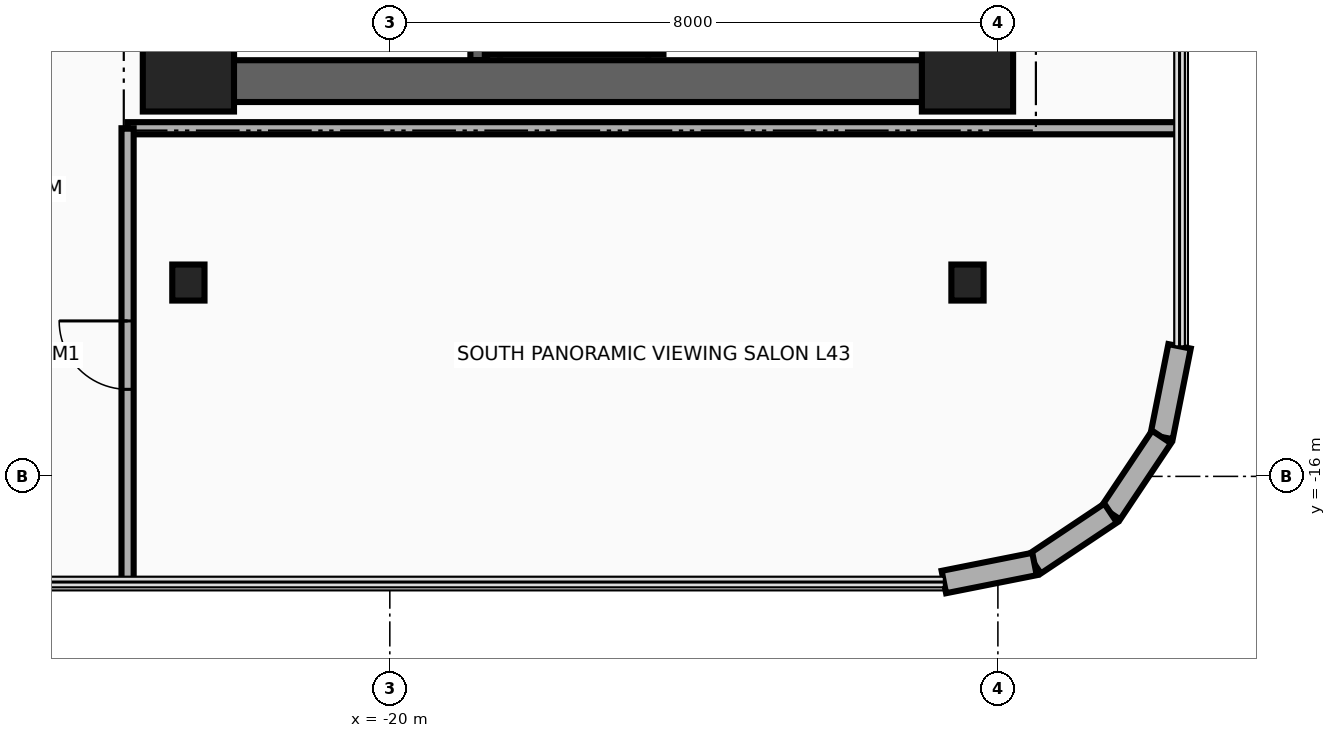
"""IFC4 building model, lengths in metres.
Left out: names, types, materials, properties, quantities, classifications, styles, units other than length and angle.
Written with IfcOpenShell. Run it as: python <this file> out.ifc"""

import sys

from ifc_helpers import new_model, si_unit, direction, frame, frame_2d, origin, origin_2d, place, context, subcontext, project, spatial, rectangle, i_section, extrude, source, transform, mapped, element, fill, save


model = new_model("IFC4")
c1 = context("Model", 3, precision=1e-05, world=origin(), true_north=direction((0.0, 1.0)))
c2 = subcontext(c1, "Body", "Model", "MODEL_VIEW")
j1 = project(units=[si_unit("LENGTHUNIT", "METRE"), si_unit("PLANEANGLEUNIT", "RADIAN")], contexts=[c1])
p1 = place(None, origin())
s1 = spatial("IfcSite", under=j1, at=p1, CompositionType="ELEMENT")
p2 = place(p1, origin())
s2 = spatial("IfcBuilding", under=s1, at=p2, CompositionType="ELEMENT")
p3 = place(p2, frame((0.0, 0.0, 168.6)))
s3 = spatial("IfcBuildingStorey", under=s2, at=p3, CompositionType="ELEMENT", Elevation=168.6)
for number, where, z_axis, x_axis in (
    (1, (-22.16, -10.525, 0.0), (0.0, 0.0, 1.0), (0.0, 1.0, 0.0)),
    (2, (-18.83, -10.525, 0.0), (0.0, 0.0, 1.0), (0.0, 1.0, 0.0)),
):
    element("IfcWall", number, at=place(p3, frame(where, z_axis=z_axis, x_axis=x_axis)), inside=s3, PredefinedType="SHEAR", context=c2, shape_type="SweptSolid", body=[
        extrude(rectangle(XDim=8.745, YDim=0.22, at=frame_2d((4.373, 0.0))), origin(), (0.0, 0.0, 1.0), 3.3),
    ])
p4 = place(p3, frame((-22.65, -11.075, 0.0), z_axis=(0.0, 0.0, 1.0), x_axis=(0.0, 1.0, 0.0)))
e3 = element("IfcWall", 3, at=p4, inside=s3, PredefinedType="SHEAR", context=c2, shape_type="SweptSolid", body=[
    extrude(rectangle(XDim=22.15, YDim=0.55, at=frame_2d((11.075, 0.0))), origin(), (0.0, 0.0, 1.0), 3.3),
])
p5 = place(p3, frame((-22.65, -10.8, 0.0), z_axis=(0.0, 0.0, 1.0), x_axis=(1.0, 0.0, 0.0)))
e4 = element("IfcWall", 4, at=p5, inside=s3, PredefinedType="SHEAR", context=c2, shape_type="SweptSolid", body=[
    extrude(rectangle(XDim=10.25, YDim=0.55, at=frame_2d((5.125, 0.0))), origin(), (0.0, 0.0, 1.0), 3.3),
])
m1 = source(origin(), c2, "Body", "SweptSolid", [
    extrude(rectangle(XDim=1.2, YDim=1.2, at=origin_2d()), origin(), (0.0, 0.0, 1.0), 3.7),
])
for number, where, z_axis, x_axis in (
    (5, (-22.65, -10.6, 0.0), (0.0, 0.0, 1.0), (1.0, 0.0, 0.0)),
    (6, (-12.4, -10.6, 0.0), (0.0, 0.0, 1.0), (1.0, 0.0, 0.0)),
):
    element("IfcColumn", number, at=place(p3, frame(where, z_axis=z_axis, x_axis=x_axis)), inside=s3, PredefinedType="COLUMN", context=c2, shape_type="MappedRepresentation", body=[
        mapped(m1, transform((0.0, 0.0, 0.0), x_axis=(1.0, 0.0, 0.0), y_axis=(0.0, 1.0, 0.0), z_axis=(0.0, 0.0, 1.0), scale=1.0)),
    ])
m2 = source(origin(), c2, "Body", "SweptSolid", [
    extrude(i_section(OverallWidth=0.424, OverallDepth=0.474, WebThickness=0.048, FlangeThickness=0.077, at=origin_2d()), origin(), (0.0, 0.0, 1.0), 3.7),
])
for number, where, z_axis, x_axis in (
    (7, (-22.65, -13.45, 0.0), (0.0, 0.0, 1.0), (1.0, 0.0, 0.0)),
    (8, (-12.4, -13.45, 0.0), (0.0, 0.0, 1.0), (1.0, 0.0, 0.0)),
):
    element("IfcColumn", number, at=place(p3, frame(where, z_axis=z_axis, x_axis=x_axis)), inside=s3, PredefinedType="COLUMN", context=c2, shape_type="MappedRepresentation", body=[
        mapped(m2, transform((0.0, 0.0, 0.0), x_axis=(1.0, 0.0, 0.0), y_axis=(0.0, 1.0, 0.0), z_axis=(0.0, 0.0, 1.0), scale=1.0)),
    ])
p6 = place(p3, frame((-9.61, -14.289, 0.0), z_axis=(0.0, 0.0, 1.0), x_axis=(-0.194996050505, -0.980804027463, 0.0)))
e9 = element("IfcWall", 9, at=p6, inside=s3, PredefinedType="SOLIDWALL", context=c2, shape_type="SweptSolid", body=[
    extrude(rectangle(XDim=1.216, YDim=0.3, at=frame_2d((0.608, 0.0))), origin(), (0.0, 0.0, 1.0), 3.3),
])
for number, where, z_axis, x_axis in (
    (10, (-9.847, -15.482, 0.0), (0.0, 0.0, 1.0), (-0.556, -0.831, 0.0)),
    (11, (-10.517, -16.483, 0.0), (0.0, 0.0, 1.0), (-0.831, -0.556, 0.0)),
):
    element("IfcWall", number, at=place(p3, frame(where, z_axis=z_axis, x_axis=x_axis)), inside=s3, PredefinedType="SOLIDWALL", context=c2, shape_type="SweptSolid", body=[
        extrude(rectangle(XDim=1.205, YDim=0.3, at=frame_2d((0.603, 0.0))), origin(), (0.0, 0.0, 1.0), 3.3),
    ])
p7 = place(p3, frame((-11.518, -17.153, 0.0), z_axis=(0.0, 0.0, 1.0), x_axis=(-0.980804027463, -0.194996050505, 0.0)))
e12 = element("IfcWall", 12, at=p7, inside=s3, PredefinedType="SOLIDWALL", context=c2, shape_type="SweptSolid", body=[
    extrude(rectangle(XDim=1.216, YDim=0.3, at=frame_2d((0.608, 0.0))), origin(), (0.0, 0.0, 1.0), 3.3),
])
for number, where, z_axis, x_axis in (
    (13, (-18.65, -10.45, 0.0), (0.0, 0.0, 1.0), (0.0, 1.0, 0.0)),
    (14, (-16.5, -10.45, 0.0), (0.0, 0.0, 1.0), (0.0, 1.0, 0.0)),
):
    element("IfcWall", number, at=place(p3, frame(where, z_axis=z_axis, x_axis=x_axis)), inside=s3, PredefinedType="MOVABLE", context=c2, shape_type="SweptSolid", body=[
        extrude(rectangle(XDim=2.35, YDim=0.2, at=frame_2d((1.175, 0.0))), origin(), (0.0, 0.0, 1.0), 2.085),
    ])
p8 = place(p3, frame((-18.55, -10.35, 0.0), z_axis=(0.0, 0.0, 1.0), x_axis=(1.0, 0.0, 0.0)))
e15 = element("IfcWall", 15, at=p8, inside=s3, PredefinedType="MOVABLE", context=c2, shape_type="SweptSolid", body=[
    extrude(rectangle(XDim=1.95, YDim=0.2, at=frame_2d((0.975, 0.0))), origin(), (0.0, 0.0, 1.0), 2.085),
])
p9 = place(p3, frame((-23.45, -11.42, 0.0), z_axis=(0.0, 0.0, 1.0), x_axis=(1.0, 0.0, 0.0)))
e16 = element("IfcWall", 16, at=p9, inside=s3, PredefinedType="PARTITIONING", context=c2, shape_type="SweptSolid", body=[
    extrude(rectangle(XDim=13.84, YDim=0.16, at=frame_2d((6.92, 0.0))), origin(), (0.0, 0.0, 1.0), 2.674),
])
p10 = place(p3, frame((-23.45, -17.39, 0.0), z_axis=(0.0, 0.0, 1.0), x_axis=(0.0, 1.0, 0.0)))
e17 = element("IfcWall", 17, at=p10, inside=s3, PredefinedType="PARTITIONING", context=c2, shape_type="SweptSolid", body=[
    extrude(rectangle(XDim=5.97, YDim=0.16, at=frame_2d((2.985, 0.0))), origin(), (0.0, 0.0, 1.0), 3.3),
])
p11 = place(p10, frame((2.535, 0.0, 0.0)))
e18 = element("IfcOpeningElement", 18, at=p11, cuts=e17, PredefinedType="OPENING", context=c2, shape_type="SweptSolid", body=[
    extrude(rectangle(XDim=0.9, YDim=2.1, at=frame_2d((0.45, 1.05))), frame((0.0, 0.095, 0.0), z_axis=(0.0, -1.0, 0.0), x_axis=(1.0, 0.0, 0.0)), (0.0, 0.0, 1.0), 0.19),
])
p12 = place(p11, origin())
e19 = element("IfcDoor", 19, at=p12, inside=s3, OperationType="SINGLE_SWING_RIGHT", PredefinedType="DOOR", context=c2, shape_type="SweptSolid", body=[
    extrude(rectangle(XDim=0.9, YDim=2.1, at=frame_2d((0.45, 1.05))), frame((0.0, 0.025, 0.0), z_axis=(0.0, -1.0, 0.0), x_axis=(1.0, 0.0, 0.0)), (0.0, 0.0, 1.0), 0.05),
])
fill(e18, e19)
save(model, sys.argv[1])
